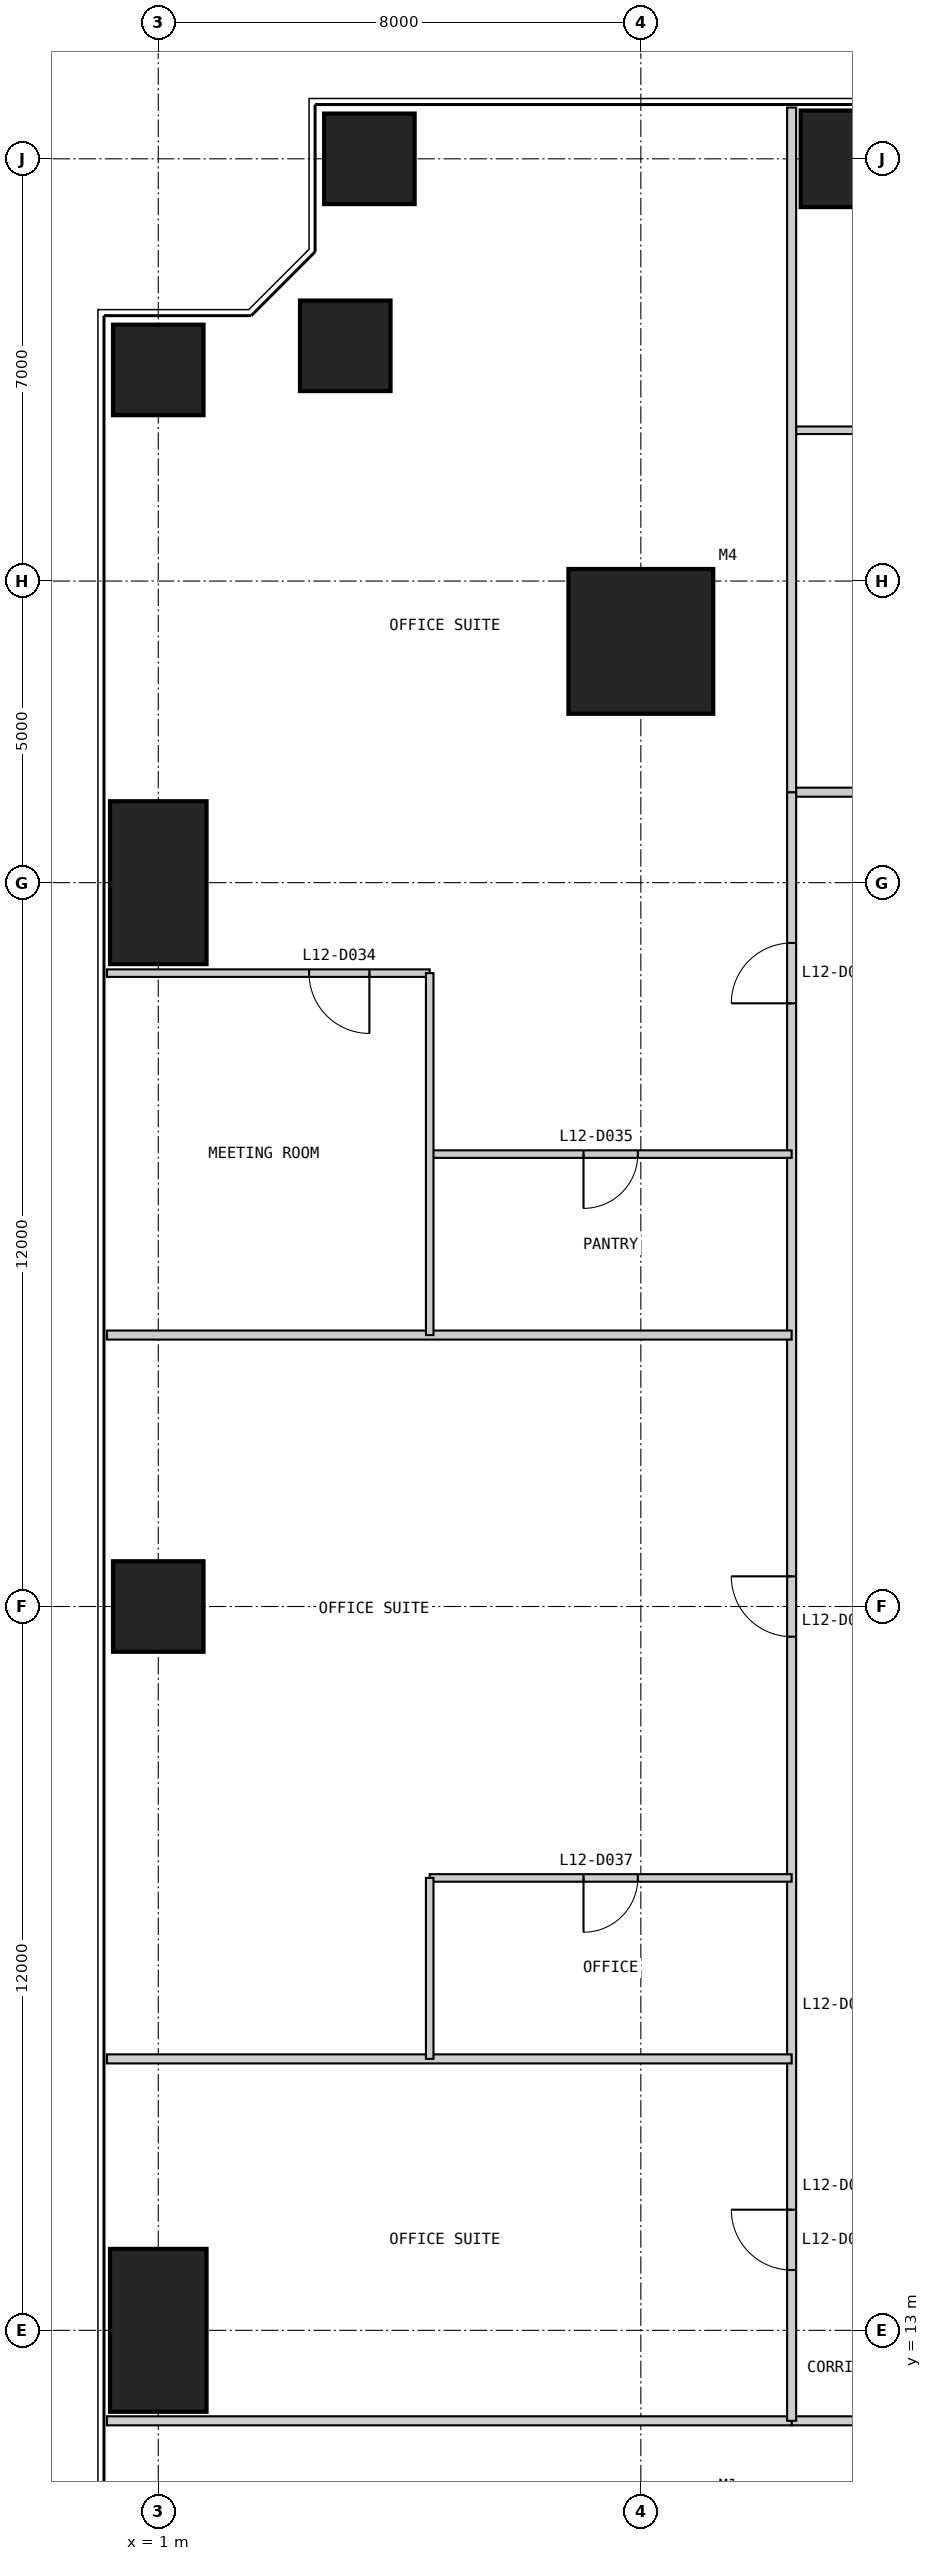
"""IFC4 building model, lengths in metres.
Left out: names, types, materials, properties, quantities, classifications, styles, units other than length and angle.
Written with IfcOpenShell. Run it as: python <this file> out.ifc"""

import sys

from ifc_helpers import new_model, si_unit, direction, frame, frame_2d, origin, origin_2d, place, context, subcontext, project, spatial, rectangle, extrude, element, fill, save


model = new_model("IFC4")
c1 = context("Model", 3, precision=1e-05, world=origin(), true_north=direction((0.0, 1.0)))
c2 = subcontext(c1, "Body", "Model", "MODEL_VIEW")
j1 = project(units=[si_unit("LENGTHUNIT", "METRE"), si_unit("PLANEANGLEUNIT", "RADIAN")], contexts=[c1])
p1 = place(None, origin())
s1 = spatial("IfcSite", under=j1, at=p1, CompositionType="ELEMENT")
p2 = place(p1, origin())
s2 = spatial("IfcBuilding", under=s1, at=p2, CompositionType="ELEMENT")
p3 = place(p2, frame((0.0, 0.0, 55.0)))
s3 = spatial("IfcBuildingStorey", under=s2, at=p3, CompositionType="ELEMENT", Elevation=55.0)
p4 = place(p3, frame((9.0, 41.0, 0.0), z_axis=(0.0, 0.0, 1.0), x_axis=(1.0, 0.0, 0.0)))
e1 = element("IfcColumn", 1, at=p4, inside=s3, PredefinedType="COLUMN", context=c2, shape_type="SweptSolid", body=[
    extrude(rectangle(XDim=2.4, YDim=2.4, at=origin_2d()), origin(), (0.0, 0.0, 1.0), 4.0),
])
p5 = place(p3, frame((13.0, 49.0, 0.0), z_axis=(0.0, 0.0, 1.0), x_axis=(1.0, 0.0, 0.0)))
e2 = element("IfcColumn", 2, at=p5, inside=s3, PredefinedType="COLUMN", context=c2, shape_type="SweptSolid", body=[
    extrude(rectangle(XDim=2.7, YDim=1.6, at=origin_2d()), origin(), (0.0, 0.0, 1.0), 4.0),
])
for number, where, z_axis, x_axis in (
    (3, (4.5, 49.0, 0.0), (0.0, 0.0, 1.0), (1.0, 0.0, 0.0)),
    (4, (4.1, 45.9, 0.0), (0.0, 0.0, 1.0), (1.0, 0.0, 0.0)),
    (5, (1.0, 45.5, 0.0), (0.0, 0.0, 1.0), (1.0, 0.0, 0.0)),
):
    element("IfcColumn", number, at=place(p3, frame(where, z_axis=z_axis, x_axis=x_axis)), inside=s3, PredefinedType="COLUMN", context=c2, shape_type="SweptSolid", body=[
        extrude(rectangle(XDim=1.5, YDim=1.5, at=origin_2d()), origin(), (0.0, 0.0, 1.0), 4.0),
    ])
p6 = place(p3, frame((1.0, 37.0, 0.0), z_axis=(0.0, 0.0, 1.0), x_axis=(1.0, 0.0, 0.0)))
e6 = element("IfcColumn", 6, at=p6, inside=s3, PredefinedType="COLUMN", context=c2, shape_type="SweptSolid", body=[
    extrude(rectangle(XDim=1.6, YDim=2.7, at=origin_2d()), origin(), (0.0, 0.0, 1.0), 4.0),
])
p7 = place(p3, frame((1.0, 25.0, 0.0), z_axis=(0.0, 0.0, 1.0), x_axis=(1.0, 0.0, 0.0)))
e7 = element("IfcColumn", 7, at=p7, inside=s3, PredefinedType="COLUMN", context=c2, shape_type="SweptSolid", body=[
    extrude(rectangle(XDim=1.5, YDim=1.5, at=origin_2d()), origin(), (0.0, 0.0, 1.0), 4.0),
])
p8 = place(p3, frame((1.0, 13.0, 0.0), z_axis=(0.0, 0.0, 1.0), x_axis=(1.0, 0.0, 0.0)))
e8 = element("IfcColumn", 8, at=p8, inside=s3, PredefinedType="COLUMN", context=c2, shape_type="SweptSolid", body=[
    extrude(rectangle(XDim=1.6, YDim=2.7, at=origin_2d()), origin(), (0.0, 0.0, 1.0), 4.0),
])
p9 = place(p3, frame((11.5, 11.5, 0.0), z_axis=(0.0, 0.0, 1.0), x_axis=(1.0, 0.0, 0.0)))
e9 = element("IfcWall", 9, at=p9, inside=s3, PredefinedType="PARTITIONING", context=c2, shape_type="SweptSolid", body=[
    extrude(rectangle(XDim=27.0, YDim=0.15, at=frame_2d((13.5, 0.0))), origin(), (0.0, 0.0, 1.0), 3.85),
])
p10 = place(p9, frame((2.5, 0.0, 0.0)))
e10 = element("IfcOpeningElement", 10, at=p10, cuts=e9, PredefinedType="OPENING", context=c2, shape_type="SweptSolid", body=[
    extrude(rectangle(XDim=1.0, YDim=2.2, at=frame_2d((0.5, 1.1))), frame((0.0, 0.085, 0.0), z_axis=(0.0, -1.0, 0.0), x_axis=(1.0, 0.0, 0.0)), (0.0, 0.0, 1.0), 0.17),
])
p11 = place(p9, frame((16.0, 0.0, 0.0)))
e11 = element("IfcOpeningElement", 11, at=p11, cuts=e9, PredefinedType="OPENING", context=c2, shape_type="SweptSolid", body=[
    extrude(rectangle(XDim=1.0, YDim=2.2, at=frame_2d((0.5, 1.1))), frame((0.0, 0.085, 0.0), z_axis=(0.0, -1.0, 0.0), x_axis=(1.0, 0.0, 0.0)), (0.0, 0.0, 1.0), 0.17),
])
p12 = place(p3, frame((0.15, 11.5, 0.0), z_axis=(0.0, 0.0, 1.0), x_axis=(1.0, 0.0, 0.0)))
e12 = element("IfcWall", 12, at=p12, inside=s3, PredefinedType="PARTITIONING", context=c2, shape_type="SweptSolid", body=[
    extrude(rectangle(XDim=11.35, YDim=0.15, at=frame_2d((5.675, 0.0))), origin(), (0.0, 0.0, 1.0), 3.85),
])
p13 = place(p3, frame((38.5, 38.5, 0.0), z_axis=(0.0, 0.0, 1.0), x_axis=(-1.0, 0.0, 0.0)))
e13 = element("IfcWall", 13, at=p13, inside=s3, PredefinedType="PARTITIONING", context=c2, shape_type="SweptSolid", body=[
    extrude(rectangle(XDim=27.0, YDim=0.15, at=frame_2d((13.5, 0.0))), origin(), (0.0, 0.0, 1.0), 3.85),
])
p14 = place(p13, frame((2.5, 0.0, 0.0)))
e14 = element("IfcOpeningElement", 14, at=p14, cuts=e13, PredefinedType="OPENING", context=c2, shape_type="SweptSolid", body=[
    extrude(rectangle(XDim=1.0, YDim=2.2, at=frame_2d((0.5, 1.1))), frame((0.0, 0.085, 0.0), z_axis=(0.0, -1.0, 0.0), x_axis=(1.0, 0.0, 0.0)), (0.0, 0.0, 1.0), 0.17),
])
p15 = place(p13, frame((16.0, 0.0, 0.0)))
e15 = element("IfcOpeningElement", 15, at=p15, cuts=e13, PredefinedType="OPENING", context=c2, shape_type="SweptSolid", body=[
    extrude(rectangle(XDim=1.0, YDim=2.2, at=frame_2d((0.5, 1.1))), frame((0.0, 0.085, 0.0), z_axis=(0.0, -1.0, 0.0), x_axis=(1.0, 0.0, 0.0)), (0.0, 0.0, 1.0), 0.17),
])
p16 = place(p3, frame((17.5, 44.5, 0.0), z_axis=(0.0, 0.0, 1.0), x_axis=(-1.0, 0.0, 0.0)))
e16 = element("IfcWall", 16, at=p16, inside=s3, PredefinedType="PARTITIONING", context=c2, shape_type="SweptSolid", body=[
    extrude(rectangle(XDim=6.0, YDim=0.125, at=frame_2d((3.0, 0.0))), origin(), (0.0, 0.0, 1.0), 3.85),
])
p17 = place(p3, frame((11.5, 38.5, 0.0), z_axis=(0.0, 0.0, 1.0), x_axis=(0.0, -1.0, 0.0)))
e17 = element("IfcWall", 17, at=p17, inside=s3, PredefinedType="PARTITIONING", context=c2, shape_type="SweptSolid", body=[
    extrude(rectangle(XDim=27.0, YDim=0.15, at=frame_2d((13.5, 0.0))), origin(), (0.0, 0.0, 1.0), 3.85),
])
p18 = place(p17, frame((2.5, 0.0, 0.0)))
e18 = element("IfcOpeningElement", 18, at=p18, cuts=e17, PredefinedType="OPENING", context=c2, shape_type="SweptSolid", body=[
    extrude(rectangle(XDim=1.0, YDim=2.2, at=frame_2d((0.5, 1.1))), frame((0.0, 0.085, 0.0), z_axis=(0.0, -1.0, 0.0), x_axis=(1.0, 0.0, 0.0)), (0.0, 0.0, 1.0), 0.17),
])
p19 = place(p17, frame((13.0, 0.0, 0.0)))
e19 = element("IfcOpeningElement", 19, at=p19, cuts=e17, PredefinedType="OPENING", context=c2, shape_type="SweptSolid", body=[
    extrude(rectangle(XDim=1.0, YDim=2.2, at=frame_2d((0.5, 1.1))), frame((0.0, 0.085, 0.0), z_axis=(0.0, -1.0, 0.0), x_axis=(1.0, 0.0, 0.0)), (0.0, 0.0, 1.0), 0.17),
])
p20 = place(p17, frame((23.5, 0.0, 0.0)))
e20 = element("IfcOpeningElement", 20, at=p20, cuts=e17, PredefinedType="OPENING", context=c2, shape_type="SweptSolid", body=[
    extrude(rectangle(XDim=1.0, YDim=2.2, at=frame_2d((0.5, 1.1))), frame((0.0, 0.085, 0.0), z_axis=(0.0, -1.0, 0.0), x_axis=(1.0, 0.0, 0.0)), (0.0, 0.0, 1.0), 0.17),
])
p21 = place(p3, frame((11.5, 49.85, 0.0), z_axis=(0.0, 0.0, 1.0), x_axis=(0.0, -1.0, 0.0)))
e21 = element("IfcWall", 21, at=p21, inside=s3, PredefinedType="PARTITIONING", context=c2, shape_type="SweptSolid", body=[
    extrude(rectangle(XDim=11.35, YDim=0.15, at=frame_2d((5.675, 0.0))), origin(), (0.0, 0.0, 1.0), 3.85),
])
p22 = place(p3, frame((0.15, 35.5, 0.0), z_axis=(0.0, 0.0, 1.0), x_axis=(1.0, 0.0, 0.0)))
e22 = element("IfcWall", 22, at=p22, inside=s3, PredefinedType="PARTITIONING", context=c2, shape_type="SweptSolid", body=[
    extrude(rectangle(XDim=5.35, YDim=0.125, at=frame_2d((2.675, 0.0))), origin(), (0.0, 0.0, 1.0), 3.85),
])
p23 = place(p22, frame((3.35, 0.0, 0.0)))
e23 = element("IfcOpeningElement", 23, at=p23, cuts=e22, PredefinedType="OPENING", context=c2, shape_type="SweptSolid", body=[
    extrude(rectangle(XDim=1.0, YDim=2.2, at=frame_2d((0.5, 1.1))), frame((0.0, 0.073, 0.0), z_axis=(0.0, -1.0, 0.0), x_axis=(1.0, 0.0, 0.0)), (0.0, 0.0, 1.0), 0.145),
])
p24 = place(p3, frame((5.5, 32.5, 0.0), z_axis=(0.0, 0.0, 1.0), x_axis=(1.0, 0.0, 0.0)))
e24 = element("IfcWall", 24, at=p24, inside=s3, PredefinedType="PARTITIONING", context=c2, shape_type="SweptSolid", body=[
    extrude(rectangle(XDim=6.0, YDim=0.125, at=frame_2d((3.0, 0.0))), origin(), (0.0, 0.0, 1.0), 3.85),
])
p25 = place(p24, frame((2.55, 0.0, 0.0)))
e25 = element("IfcOpeningElement", 25, at=p25, cuts=e24, PredefinedType="OPENING", context=c2, shape_type="SweptSolid", body=[
    extrude(rectangle(XDim=0.9, YDim=2.2, at=frame_2d((0.45, 1.1))), frame((0.0, 0.073, 0.0), z_axis=(0.0, -1.0, 0.0), x_axis=(1.0, 0.0, 0.0)), (0.0, 0.0, 1.0), 0.145),
])
p26 = place(p3, frame((0.15, 29.5, 0.0), z_axis=(0.0, 0.0, 1.0), x_axis=(1.0, 0.0, 0.0)))
e26 = element("IfcWall", 26, at=p26, inside=s3, PredefinedType="PARTITIONING", context=c2, shape_type="SweptSolid", body=[
    extrude(rectangle(XDim=11.35, YDim=0.15, at=frame_2d((5.675, 0.0))), origin(), (0.0, 0.0, 1.0), 3.85),
])
p27 = place(p3, frame((5.5, 20.5, 0.0), z_axis=(0.0, 0.0, 1.0), x_axis=(1.0, 0.0, 0.0)))
e27 = element("IfcWall", 27, at=p27, inside=s3, PredefinedType="PARTITIONING", context=c2, shape_type="SweptSolid", body=[
    extrude(rectangle(XDim=6.0, YDim=0.125, at=frame_2d((3.0, 0.0))), origin(), (0.0, 0.0, 1.0), 3.85),
])
p28 = place(p27, frame((2.55, 0.0, 0.0)))
e28 = element("IfcOpeningElement", 28, at=p28, cuts=e27, PredefinedType="OPENING", context=c2, shape_type="SweptSolid", body=[
    extrude(rectangle(XDim=0.9, YDim=2.2, at=frame_2d((0.45, 1.1))), frame((0.0, 0.073, 0.0), z_axis=(0.0, -1.0, 0.0), x_axis=(1.0, 0.0, 0.0)), (0.0, 0.0, 1.0), 0.145),
])
p29 = place(p3, frame((0.15, 17.5, 0.0), z_axis=(0.0, 0.0, 1.0), x_axis=(1.0, 0.0, 0.0)))
e29 = element("IfcWall", 29, at=p29, inside=s3, PredefinedType="PARTITIONING", context=c2, shape_type="SweptSolid", body=[
    extrude(rectangle(XDim=11.35, YDim=0.15, at=frame_2d((5.675, 0.0))), origin(), (0.0, 0.0, 1.0), 3.85),
])
p30 = place(p3, frame((5.5, 35.5, 0.0), z_axis=(0.0, 0.0, 1.0), x_axis=(0.0, -1.0, 0.0)))
e30 = element("IfcWall", 30, at=p30, inside=s3, PredefinedType="PARTITIONING", context=c2, shape_type="SweptSolid", body=[
    extrude(rectangle(XDim=6.0, YDim=0.125, at=frame_2d((3.0, 0.0))), origin(), (0.0, 0.0, 1.0), 3.85),
])
p31 = place(p3, frame((5.5, 20.5, 0.0), z_axis=(0.0, 0.0, 1.0), x_axis=(0.0, -1.0, 0.0)))
e31 = element("IfcWall", 31, at=p31, inside=s3, PredefinedType="PARTITIONING", context=c2, shape_type="SweptSolid", body=[
    extrude(rectangle(XDim=3.0, YDim=0.125, at=frame_2d((1.5, 0.0))), origin(), (0.0, 0.0, 1.0), 3.85),
])
p32 = place(p18, frame((1.0, 0.0, 0.0), z_axis=(0.0, 0.0, 1.0), x_axis=(-1.0, 0.0, 0.0)))
e32 = element("IfcDoor", 32, at=p32, inside=s3, OperationType="SINGLE_SWING_LEFT", PredefinedType="DOOR", context=c2, shape_type="SweptSolid", body=[
    extrude(rectangle(XDim=1.0, YDim=2.2, at=frame_2d((0.5, 1.1))), frame((0.0, 0.025, 0.0), z_axis=(0.0, -1.0, 0.0), x_axis=(1.0, 0.0, 0.0)), (0.0, 0.0, 1.0), 0.05),
])
fill(e18, e32)
p33 = place(p23, frame((1.0, 0.0, 0.0), z_axis=(0.0, 0.0, 1.0), x_axis=(-1.0, 0.0, 0.0)))
e33 = element("IfcDoor", 33, at=p33, inside=s3, OperationType="SINGLE_SWING_LEFT", PredefinedType="DOOR", context=c2, shape_type="SweptSolid", body=[
    extrude(rectangle(XDim=1.0, YDim=2.2, at=frame_2d((0.5, 1.1))), frame((0.0, 0.025, 0.0), z_axis=(0.0, -1.0, 0.0), x_axis=(1.0, 0.0, 0.0)), (0.0, 0.0, 1.0), 0.05),
])
fill(e23, e33)
p34 = place(p25, frame((0.9, 0.0, 0.0), z_axis=(0.0, 0.0, 1.0), x_axis=(-1.0, 0.0, 0.0)))
e34 = element("IfcDoor", 34, at=p34, inside=s3, OperationType="SINGLE_SWING_RIGHT", PredefinedType="DOOR", context=c2, shape_type="SweptSolid", body=[
    extrude(rectangle(XDim=0.9, YDim=2.2, at=frame_2d((0.45, 1.1))), frame((0.0, 0.025, 0.0), z_axis=(0.0, -1.0, 0.0), x_axis=(1.0, 0.0, 0.0)), (0.0, 0.0, 1.0), 0.05),
])
fill(e25, e34)
p35 = place(p19, frame((1.0, 0.0, 0.0), z_axis=(0.0, 0.0, 1.0), x_axis=(-1.0, 0.0, 0.0)))
e35 = element("IfcDoor", 35, at=p35, inside=s3, OperationType="SINGLE_SWING_RIGHT", PredefinedType="DOOR", context=c2, shape_type="SweptSolid", body=[
    extrude(rectangle(XDim=1.0, YDim=2.2, at=frame_2d((0.5, 1.1))), frame((0.0, 0.025, 0.0), z_axis=(0.0, -1.0, 0.0), x_axis=(1.0, 0.0, 0.0)), (0.0, 0.0, 1.0), 0.05),
])
fill(e19, e35)
p36 = place(p28, frame((0.9, 0.0, 0.0), z_axis=(0.0, 0.0, 1.0), x_axis=(-1.0, 0.0, 0.0)))
e36 = element("IfcDoor", 36, at=p36, inside=s3, OperationType="SINGLE_SWING_RIGHT", PredefinedType="DOOR", context=c2, shape_type="SweptSolid", body=[
    extrude(rectangle(XDim=0.9, YDim=2.2, at=frame_2d((0.45, 1.1))), frame((0.0, 0.025, 0.0), z_axis=(0.0, -1.0, 0.0), x_axis=(1.0, 0.0, 0.0)), (0.0, 0.0, 1.0), 0.05),
])
fill(e28, e36)
p37 = place(p20, frame((1.0, 0.0, 0.0), z_axis=(0.0, 0.0, 1.0), x_axis=(-1.0, 0.0, 0.0)))
e37 = element("IfcDoor", 37, at=p37, inside=s3, OperationType="SINGLE_SWING_RIGHT", PredefinedType="DOOR", context=c2, shape_type="SweptSolid", body=[
    extrude(rectangle(XDim=1.0, YDim=2.2, at=frame_2d((0.5, 1.1))), frame((0.0, 0.025, 0.0), z_axis=(0.0, -1.0, 0.0), x_axis=(1.0, 0.0, 0.0)), (0.0, 0.0, 1.0), 0.05),
])
fill(e20, e37)
save(model, sys.argv[1])
